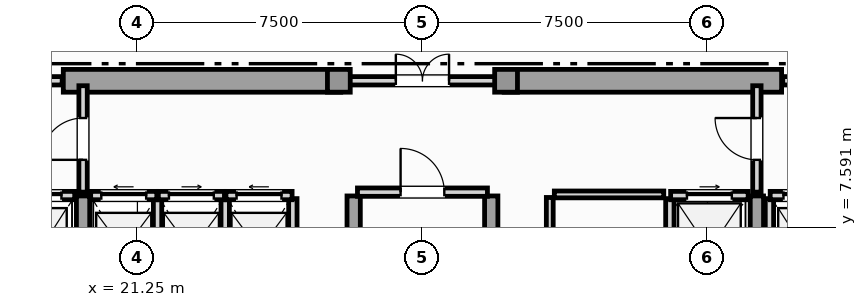
"""IFC4 building model, lengths in metres.
Left out: names, types, materials, properties, quantities, classifications, styles, units other than length and angle.
Written with IfcOpenShell. Run it as: python <this file> out.ifc"""

import sys

from ifc_helpers import new_model, si_unit, direction, frame, frame_2d, origin, origin_2d, place, context, subcontext, project, spatial, rectangle, extrude, element, fill, save


model = new_model("IFC4")
c1 = context("Model", 3, precision=1e-05, world=origin(), true_north=direction((0.0, 1.0)))
c2 = subcontext(c1, "Body", "Model", "MODEL_VIEW")
j1 = project(units=[si_unit("LENGTHUNIT", "METRE"), si_unit("PLANEANGLEUNIT", "RADIAN")], contexts=[c1])
p1 = place(None, origin())
s1 = spatial("IfcSite", under=j1, at=p1, CompositionType="ELEMENT")
p2 = place(p1, origin())
s2 = spatial("IfcBuilding", under=s1, at=p2, CompositionType="ELEMENT")
p3 = place(p2, frame((0.0, 0.0, 276.0)))
s3 = spatial("IfcBuildingStorey", under=s2, at=p3, CompositionType="ELEMENT", Elevation=276.0)
for number, where, z_axis, x_axis in (
    (1, (19.3, 11.45, 0.0), (0.0, 0.0, 1.0), (1.0, 0.0, 0.0)),
    (2, (30.9, 11.45, 0.0), (0.0, 0.0, 1.0), (1.0, 0.0, 0.0)),
):
    element("IfcWall", number, at=place(p3, frame(where, z_axis=z_axis, x_axis=x_axis)), inside=s3, PredefinedType="SHEAR", context=c2, shape_type="SweptSolid", body=[
        extrude(rectangle(XDim=7.3, YDim=0.6, at=frame_2d((3.65, 0.0))), origin(), (0.0, 0.0, 1.0), 4.85),
    ])
for number, where, z_axis, x_axis in (
    (3, (19.82, 0.92, 0.0), (0.0, 0.0, 1.0), (0.0, 1.0, 0.0)),
    (4, (26.94, 0.92, 0.0), (0.0, 0.0, 1.0), (0.0, 1.0, 0.0)),
    (5, (30.56, 0.92, 0.0), (0.0, 0.0, 1.0), (0.0, 1.0, 0.0)),
    (6, (37.55, 0.92, 0.0), (0.0, 0.0, 1.0), (0.0, 1.0, 0.0)),
):
    element("IfcWall", number, at=place(p3, frame(where, z_axis=z_axis, x_axis=x_axis)), inside=s3, PredefinedType="SHEAR", context=c2, shape_type="SweptSolid", body=[
        extrude(rectangle(XDim=7.5, YDim=0.35, at=frame_2d((3.75, 0.0))), origin(), (0.0, 0.0, 1.0), 4.85),
    ])
for number, where, z_axis, x_axis in (
    (7, (26.55, 11.45, 0.0), (0.0, 0.0, 1.0), (1.0, 0.0, 0.0)),
    (8, (30.95, 11.45, 0.0), (0.0, 0.0, 1.0), (1.0, 0.0, 0.0)),
):
    element("IfcColumn", number, at=place(p3, frame(where, z_axis=z_axis, x_axis=x_axis)), inside=s3, PredefinedType="COLUMN", context=c2, shape_type="SweptSolid", body=[
        extrude(rectangle(XDim=0.6, YDim=0.6, at=origin_2d()), origin(), (0.0, 0.0, 1.0), 5.05),
    ])
p4 = place(p3, frame((17.78, 8.43, 0.0), z_axis=(0.0, 0.0, 1.0), x_axis=(1.0, 0.0, 0.0)))
e9 = element("IfcWall", 9, at=p4, inside=s3, PredefinedType="SOLIDWALL", context=c2, shape_type="SweptSolid", body=[
    extrude(rectangle(XDim=1.82, YDim=0.22, at=frame_2d((0.91, 0.0))), origin(), (0.0, 0.0, 1.0), 4.85),
])
p5 = place(p4, frame((0.35, 0.0, 0.0)))
e10 = element("IfcOpeningElement", 10, at=p5, cuts=e9, PredefinedType="OPENING", context=c2, shape_type="SweptSolid", body=[
    extrude(rectangle(XDim=1.12, YDim=2.25, at=frame_2d((0.56, 1.125))), frame((0.0, 0.12, 0.0), z_axis=(0.0, -1.0, 0.0), x_axis=(1.0, 0.0, 0.0)), (0.0, 0.0, 1.0), 0.24),
])
p6 = place(p3, frame((37.88, 5.65, 0.0), z_axis=(0.0, 0.0, 1.0), x_axis=(0.0, 1.0, 0.0)))
e11 = element("IfcWall", 11, at=p6, inside=s3, PredefinedType="SOLIDWALL", context=c2, shape_type="SweptSolid", body=[
    extrude(rectangle(XDim=2.7, YDim=0.22, at=frame_2d((1.35, 0.0))), origin(), (0.0, 0.0, 1.0), 4.85),
])
p7 = place(p3, frame((37.9, 8.43, 0.0), z_axis=(0.0, 0.0, 1.0), x_axis=(1.0, 0.0, 0.0)))
e12 = element("IfcWall", 12, at=p7, inside=s3, PredefinedType="SOLIDWALL", context=c2, shape_type="SweptSolid", body=[
    extrude(rectangle(XDim=1.82, YDim=0.22, at=frame_2d((0.91, 0.0))), origin(), (0.0, 0.0, 1.0), 4.85),
])
p8 = place(p7, frame((0.35, 0.0, 0.0)))
e13 = element("IfcOpeningElement", 13, at=p8, cuts=e12, PredefinedType="OPENING", context=c2, shape_type="SweptSolid", body=[
    extrude(rectangle(XDim=1.12, YDim=2.25, at=frame_2d((0.56, 1.125))), frame((0.0, 0.12, 0.0), z_axis=(0.0, -1.0, 0.0), x_axis=(1.0, 0.0, 0.0)), (0.0, 0.0, 1.0), 0.24),
])
p9 = place(p3, frame((35.26, 5.65, 0.0), z_axis=(0.0, 0.0, 1.0), x_axis=(0.0, 1.0, 0.0)))
e14 = element("IfcWall", 14, at=p9, inside=s3, PredefinedType="SOLIDWALL", context=c2, shape_type="SweptSolid", body=[
    extrude(rectangle(XDim=2.7, YDim=0.22, at=frame_2d((1.35, 0.0))), origin(), (0.0, 0.0, 1.0), 4.85),
])
p10 = place(p3, frame((35.28, 8.43, 0.0), z_axis=(0.0, 0.0, 1.0), x_axis=(1.0, 0.0, 0.0)))
e15 = element("IfcWall", 15, at=p10, inside=s3, PredefinedType="SOLIDWALL", context=c2, shape_type="SweptSolid", body=[
    extrude(rectangle(XDim=2.04, YDim=0.22, at=frame_2d((1.02, 0.0))), origin(), (0.0, 0.0, 1.0), 4.85),
])
p11 = place(p10, frame((0.43, 0.0, 0.0)))
e16 = element("IfcOpeningElement", 16, at=p11, cuts=e15, PredefinedType="OPENING", context=c2, shape_type="SweptSolid", body=[
    extrude(rectangle(XDim=1.18, YDim=2.2, at=frame_2d((0.59, 1.1))), frame((0.0, 0.12, 0.0), z_axis=(0.0, -1.0, 0.0), x_axis=(1.0, 0.0, 0.0)), (0.0, 0.0, 1.0), 0.24),
])
p12 = place(p3, frame((21.78, 5.65, 0.0), z_axis=(0.0, 0.0, 1.0), x_axis=(0.0, 1.0, 0.0)))
e17 = element("IfcWall", 17, at=p12, inside=s3, PredefinedType="SOLIDWALL", context=c2, shape_type="SweptSolid", body=[
    extrude(rectangle(XDim=2.7, YDim=0.22, at=frame_2d((1.35, 0.0))), origin(), (0.0, 0.0, 1.0), 4.85),
])
p13 = place(p3, frame((20.02, 8.43, 0.0), z_axis=(0.0, 0.0, 1.0), x_axis=(1.0, 0.0, 0.0)))
e18 = element("IfcWall", 18, at=p13, inside=s3, PredefinedType="SOLIDWALL", context=c2, shape_type="SweptSolid", body=[
    extrude(rectangle(XDim=1.74, YDim=0.22, at=frame_2d((0.87, 0.0))), origin(), (0.0, 0.0, 1.0), 4.85),
])
p14 = place(p13, frame((0.28, 0.0, 0.0)))
e19 = element("IfcOpeningElement", 19, at=p14, cuts=e18, PredefinedType="OPENING", context=c2, shape_type="SweptSolid", body=[
    extrude(rectangle(XDim=1.18, YDim=2.2, at=frame_2d((0.59, 1.1))), frame((0.0, 0.12, 0.0), z_axis=(0.0, -1.0, 0.0), x_axis=(1.0, 0.0, 0.0)), (0.0, 0.0, 1.0), 0.24),
])
p15 = place(p3, frame((23.56, 5.65, 0.0), z_axis=(0.0, 0.0, 1.0), x_axis=(0.0, 1.0, 0.0)))
e20 = element("IfcWall", 20, at=p15, inside=s3, PredefinedType="SOLIDWALL", context=c2, shape_type="SweptSolid", body=[
    extrude(rectangle(XDim=2.7, YDim=0.22, at=frame_2d((1.35, 0.0))), origin(), (0.0, 0.0, 1.0), 4.85),
])
p16 = place(p3, frame((21.8, 8.43, 0.0), z_axis=(0.0, 0.0, 1.0), x_axis=(1.0, 0.0, 0.0)))
e21 = element("IfcWall", 21, at=p16, inside=s3, PredefinedType="SOLIDWALL", context=c2, shape_type="SweptSolid", body=[
    extrude(rectangle(XDim=1.74, YDim=0.22, at=frame_2d((0.87, 0.0))), origin(), (0.0, 0.0, 1.0), 4.85),
])
p17 = place(p16, frame((0.28, 0.0, 0.0)))
e22 = element("IfcOpeningElement", 22, at=p17, cuts=e21, PredefinedType="OPENING", context=c2, shape_type="SweptSolid", body=[
    extrude(rectangle(XDim=1.18, YDim=2.2, at=frame_2d((0.59, 1.1))), frame((0.0, 0.12, 0.0), z_axis=(0.0, -1.0, 0.0), x_axis=(1.0, 0.0, 0.0)), (0.0, 0.0, 1.0), 0.24),
])
p18 = place(p3, frame((25.34, 5.65, 0.0), z_axis=(0.0, 0.0, 1.0), x_axis=(0.0, 1.0, 0.0)))
e23 = element("IfcWall", 23, at=p18, inside=s3, PredefinedType="SOLIDWALL", context=c2, shape_type="SweptSolid", body=[
    extrude(rectangle(XDim=2.7, YDim=0.22, at=frame_2d((1.35, 0.0))), origin(), (0.0, 0.0, 1.0), 4.85),
])
p19 = place(p3, frame((23.58, 8.43, 0.0), z_axis=(0.0, 0.0, 1.0), x_axis=(1.0, 0.0, 0.0)))
e24 = element("IfcWall", 24, at=p19, inside=s3, PredefinedType="SOLIDWALL", context=c2, shape_type="SweptSolid", body=[
    extrude(rectangle(XDim=1.74, YDim=0.22, at=frame_2d((0.87, 0.0))), origin(), (0.0, 0.0, 1.0), 4.85),
])
p20 = place(p19, frame((0.28, 0.0, 0.0)))
e25 = element("IfcOpeningElement", 25, at=p20, cuts=e24, PredefinedType="OPENING", context=c2, shape_type="SweptSolid", body=[
    extrude(rectangle(XDim=1.18, YDim=2.2, at=frame_2d((0.59, 1.1))), frame((0.0, 0.12, 0.0), z_axis=(0.0, -1.0, 0.0), x_axis=(1.0, 0.0, 0.0)), (0.0, 0.0, 1.0), 0.24),
])
p21 = place(p3, frame((27.04, 8.52, 0.0), z_axis=(0.0, 0.0, 1.0), x_axis=(1.0, 0.0, 0.0)))
e26 = element("IfcWall", 26, at=p21, inside=s3, PredefinedType="SOLIDWALL", context=c2, shape_type="SweptSolid", body=[
    extrude(rectangle(XDim=3.42, YDim=0.22, at=frame_2d((1.71, 0.0))), origin(), (0.0, 0.0, 1.0), 4.85),
])
p22 = place(p21, frame((1.135, 0.0, 0.0)))
e27 = element("IfcOpeningElement", 27, at=p22, cuts=e26, PredefinedType="OPENING", context=c2, shape_type="SweptSolid", body=[
    extrude(rectangle(XDim=1.15, YDim=2.2, at=frame_2d((0.575, 1.1))), frame((0.0, 0.12, 0.0), z_axis=(0.0, -1.0, 0.0), x_axis=(1.0, 0.0, 0.0)), (0.0, 0.0, 1.0), 0.24),
])
p23 = place(p3, frame((19.82, 8.52, 0.0), z_axis=(0.0, 0.0, 1.0), x_axis=(0.0, 1.0, 0.0)))
e28 = element("IfcWall", 28, at=p23, inside=s3, PredefinedType="SOLIDWALL", context=c2, shape_type="SweptSolid", body=[
    extrude(rectangle(XDim=2.8, YDim=0.22, at=frame_2d((1.4, 0.0))), origin(), (0.0, 0.0, 1.0), 4.305),
])
p24 = place(p23, frame((0.85, 0.0, 0.0)))
e29 = element("IfcOpeningElement", 29, at=p24, cuts=e28, PredefinedType="OPENING", context=c2, shape_type="SweptSolid", body=[
    extrude(rectangle(XDim=1.1, YDim=2.2, at=frame_2d((0.55, 1.1))), frame((0.0, 0.12, 0.0), z_axis=(0.0, -1.0, 0.0), x_axis=(1.0, 0.0, 0.0)), (0.0, 0.0, 1.0), 0.24),
])
p25 = place(p3, frame((37.55, 8.52, 0.0), z_axis=(0.0, 0.0, 1.0), x_axis=(0.0, 1.0, 0.0)))
e30 = element("IfcWall", 30, at=p25, inside=s3, PredefinedType="SOLIDWALL", context=c2, shape_type="SweptSolid", body=[
    extrude(rectangle(XDim=2.8, YDim=0.22, at=frame_2d((1.4, 0.0))), origin(), (0.0, 0.0, 1.0), 4.305),
])
p26 = place(p25, frame((0.85, 0.0, 0.0)))
e31 = element("IfcOpeningElement", 31, at=p26, cuts=e30, PredefinedType="OPENING", context=c2, shape_type="SweptSolid", body=[
    extrude(rectangle(XDim=1.1, YDim=2.2, at=frame_2d((0.55, 1.1))), frame((0.0, 0.12, 0.0), z_axis=(0.0, -1.0, 0.0), x_axis=(1.0, 0.0, 0.0)), (0.0, 0.0, 1.0), 0.24),
])
p27 = place(p3, frame((16.23, 11.45, 0.0), z_axis=(0.0, 0.0, 1.0), x_axis=(1.0, 0.0, 0.0)))
e32 = element("IfcWall", 32, at=p27, inside=s3, PredefinedType="SOLIDWALL", context=c2, shape_type="SweptSolid", body=[
    extrude(rectangle(XDim=3.04, YDim=0.22, at=frame_2d((1.52, 0.0))), origin(), (0.0, 0.0, 1.0), 4.85),
])
p28 = place(p27, frame((0.97, 0.0, 0.0)))
e33 = element("IfcOpeningElement", 33, at=p28, cuts=e32, PredefinedType="OPENING", context=c2, shape_type="SweptSolid", body=[
    extrude(rectangle(XDim=1.1, YDim=2.2, at=frame_2d((0.55, 1.1))), frame((0.0, 0.12, 0.0), z_axis=(0.0, -1.0, 0.0), x_axis=(1.0, 0.0, 0.0)), (0.0, 0.0, 1.0), 0.24),
])
p29 = place(p3, frame((26.63, 11.45, 0.0), z_axis=(0.0, 0.0, 1.0), x_axis=(1.0, 0.0, 0.0)))
e34 = element("IfcWall", 34, at=p29, inside=s3, PredefinedType="SOLIDWALL", context=c2, shape_type="SweptSolid", body=[
    extrude(rectangle(XDim=4.24, YDim=0.22, at=frame_2d((2.12, 0.0))), origin(), (0.0, 0.0, 1.0), 4.85),
])
p30 = place(p29, frame((1.42, 0.0, 0.0)))
e35 = element("IfcOpeningElement", 35, at=p30, cuts=e34, PredefinedType="OPENING", context=c2, shape_type="SweptSolid", body=[
    extrude(rectangle(XDim=1.4, YDim=2.2, at=frame_2d((0.7, 1.1))), frame((0.0, 0.12, 0.0), z_axis=(0.0, -1.0, 0.0), x_axis=(1.0, 0.0, 0.0)), (0.0, 0.0, 1.0), 0.24),
])
p31 = place(p3, frame((38.23, 11.45, 0.0), z_axis=(0.0, 0.0, 1.0), x_axis=(1.0, 0.0, 0.0)))
e36 = element("IfcWall", 36, at=p31, inside=s3, PredefinedType="SOLIDWALL", context=c2, shape_type="SweptSolid", body=[
    extrude(rectangle(XDim=3.04, YDim=0.22, at=frame_2d((1.52, 0.0))), origin(), (0.0, 0.0, 1.0), 4.85),
])
p32 = place(p31, frame((0.97, 0.0, 0.0)))
e37 = element("IfcOpeningElement", 37, at=p32, cuts=e36, PredefinedType="OPENING", context=c2, shape_type="SweptSolid", body=[
    extrude(rectangle(XDim=1.1, YDim=2.2, at=frame_2d((0.55, 1.1))), frame((0.0, 0.12, 0.0), z_axis=(0.0, -1.0, 0.0), x_axis=(1.0, 0.0, 0.0)), (0.0, 0.0, 1.0), 0.24),
])
p33 = place(p3, frame((32.1, 5.65, 0.0), z_axis=(0.0, 0.0, 1.0), x_axis=(0.0, 1.0, 0.0)))
e38 = element("IfcWall", 38, at=p33, inside=s3, PredefinedType="PARTITIONING", context=c2, shape_type="SweptSolid", body=[
    extrude(rectangle(XDim=2.73, YDim=0.18, at=frame_2d((1.365, 0.0))), origin(), (0.0, 0.0, 1.0), 4.85),
])
p34 = place(p33, frame((0.84, 0.0, 0.0)))
e39 = element("IfcOpeningElement", 39, at=p34, cuts=e38, PredefinedType="OPENING", context=c2, shape_type="SweptSolid", body=[
    extrude(rectangle(XDim=1.05, YDim=2.15, at=frame_2d((0.525, 1.075))), frame((0.0, 0.1, 0.0), z_axis=(0.0, -1.0, 0.0), x_axis=(1.0, 0.0, 0.0)), (0.0, 0.0, 1.0), 0.2),
])
p35 = place(p3, frame((32.22, 8.46, 0.0), z_axis=(0.0, 0.0, 1.0), x_axis=(1.0, 0.0, 0.0)))
e40 = element("IfcWall", 40, at=p35, inside=s3, PredefinedType="PARTITIONING", context=c2, shape_type="SweptSolid", body=[
    extrude(rectangle(XDim=2.88, YDim=0.18, at=frame_2d((1.44, 0.0))), origin(), (0.0, 0.0, 1.0), 4.85),
])
p36 = place(p5, origin())
e41 = element("IfcDoor", 41, at=p36, inside=s3, OperationType="SLIDING_TO_RIGHT", PredefinedType="DOOR", context=c2, shape_type="SweptSolid", body=[
    extrude(rectangle(XDim=1.12, YDim=2.25, at=frame_2d((0.56, 1.125))), frame((0.0, 0.025, 0.0), z_axis=(0.0, -1.0, 0.0), x_axis=(1.0, 0.0, 0.0)), (0.0, 0.0, 1.0), 0.05),
])
fill(e10, e41)
p37 = place(p8, origin())
e42 = element("IfcDoor", 42, at=p37, inside=s3, OperationType="SLIDING_TO_LEFT", PredefinedType="DOOR", context=c2, shape_type="SweptSolid", body=[
    extrude(rectangle(XDim=1.12, YDim=2.25, at=frame_2d((0.56, 1.125))), frame((0.0, 0.025, 0.0), z_axis=(0.0, -1.0, 0.0), x_axis=(1.0, 0.0, 0.0)), (0.0, 0.0, 1.0), 0.05),
])
fill(e13, e42)
p38 = place(p11, origin())
e43 = element("IfcDoor", 43, at=p38, inside=s3, OperationType="SLIDING_TO_RIGHT", PredefinedType="DOOR", context=c2, shape_type="SweptSolid", body=[
    extrude(rectangle(XDim=1.18, YDim=2.2, at=frame_2d((0.59, 1.1))), frame((0.0, 0.025, 0.0), z_axis=(0.0, -1.0, 0.0), x_axis=(1.0, 0.0, 0.0)), (0.0, 0.0, 1.0), 0.05),
])
fill(e16, e43)
p39 = place(p14, origin())
e44 = element("IfcDoor", 44, at=p39, inside=s3, OperationType="SLIDING_TO_LEFT", PredefinedType="DOOR", context=c2, shape_type="SweptSolid", body=[
    extrude(rectangle(XDim=1.18, YDim=2.2, at=frame_2d((0.59, 1.1))), frame((0.0, 0.025, 0.0), z_axis=(0.0, -1.0, 0.0), x_axis=(1.0, 0.0, 0.0)), (0.0, 0.0, 1.0), 0.05),
])
fill(e19, e44)
p40 = place(p17, origin())
e45 = element("IfcDoor", 45, at=p40, inside=s3, OperationType="SLIDING_TO_RIGHT", PredefinedType="DOOR", context=c2, shape_type="SweptSolid", body=[
    extrude(rectangle(XDim=1.18, YDim=2.2, at=frame_2d((0.59, 1.1))), frame((0.0, 0.025, 0.0), z_axis=(0.0, -1.0, 0.0), x_axis=(1.0, 0.0, 0.0)), (0.0, 0.0, 1.0), 0.05),
])
fill(e22, e45)
p41 = place(p20, origin())
e46 = element("IfcDoor", 46, at=p41, inside=s3, OperationType="SLIDING_TO_LEFT", PredefinedType="DOOR", context=c2, shape_type="SweptSolid", body=[
    extrude(rectangle(XDim=1.18, YDim=2.2, at=frame_2d((0.59, 1.1))), frame((0.0, 0.025, 0.0), z_axis=(0.0, -1.0, 0.0), x_axis=(1.0, 0.0, 0.0)), (0.0, 0.0, 1.0), 0.05),
])
fill(e25, e46)
p42 = place(p22, origin())
e47 = element("IfcDoor", 47, at=p42, inside=s3, OperationType="SINGLE_SWING_LEFT", PredefinedType="DOOR", context=c2, shape_type="SweptSolid", body=[
    extrude(rectangle(XDim=1.15, YDim=2.2, at=frame_2d((0.575, 1.1))), frame((0.0, 0.025, 0.0), z_axis=(0.0, -1.0, 0.0), x_axis=(1.0, 0.0, 0.0)), (0.0, 0.0, 1.0), 0.05),
])
fill(e27, e47)
p43 = place(p24, origin())
e48 = element("IfcDoor", 48, at=p43, inside=s3, OperationType="SINGLE_SWING_LEFT", PredefinedType="DOOR", context=c2, shape_type="SweptSolid", body=[
    extrude(rectangle(XDim=1.1, YDim=2.2, at=frame_2d((0.55, 1.1))), frame((0.0, 0.025, 0.0), z_axis=(0.0, -1.0, 0.0), x_axis=(1.0, 0.0, 0.0)), (0.0, 0.0, 1.0), 0.05),
])
fill(e29, e48)
p44 = place(p26, origin())
e49 = element("IfcDoor", 49, at=p44, inside=s3, OperationType="SINGLE_SWING_RIGHT", PredefinedType="DOOR", context=c2, shape_type="SweptSolid", body=[
    extrude(rectangle(XDim=1.1, YDim=2.2, at=frame_2d((0.55, 1.1))), frame((0.0, 0.025, 0.0), z_axis=(0.0, -1.0, 0.0), x_axis=(1.0, 0.0, 0.0)), (0.0, 0.0, 1.0), 0.05),
])
fill(e31, e49)
p45 = place(p30, origin())
e50 = element("IfcDoor", 50, at=p45, inside=s3, OperationType="DOUBLE_DOOR_SINGLE_SWING", PredefinedType="DOOR", context=c2, shape_type="SweptSolid", body=[
    extrude(rectangle(XDim=1.4, YDim=2.2, at=frame_2d((0.7, 1.1))), frame((0.0, 0.025, 0.0), z_axis=(0.0, -1.0, 0.0), x_axis=(1.0, 0.0, 0.0)), (0.0, 0.0, 1.0), 0.05),
])
fill(e35, e50)
save(model, sys.argv[1])
